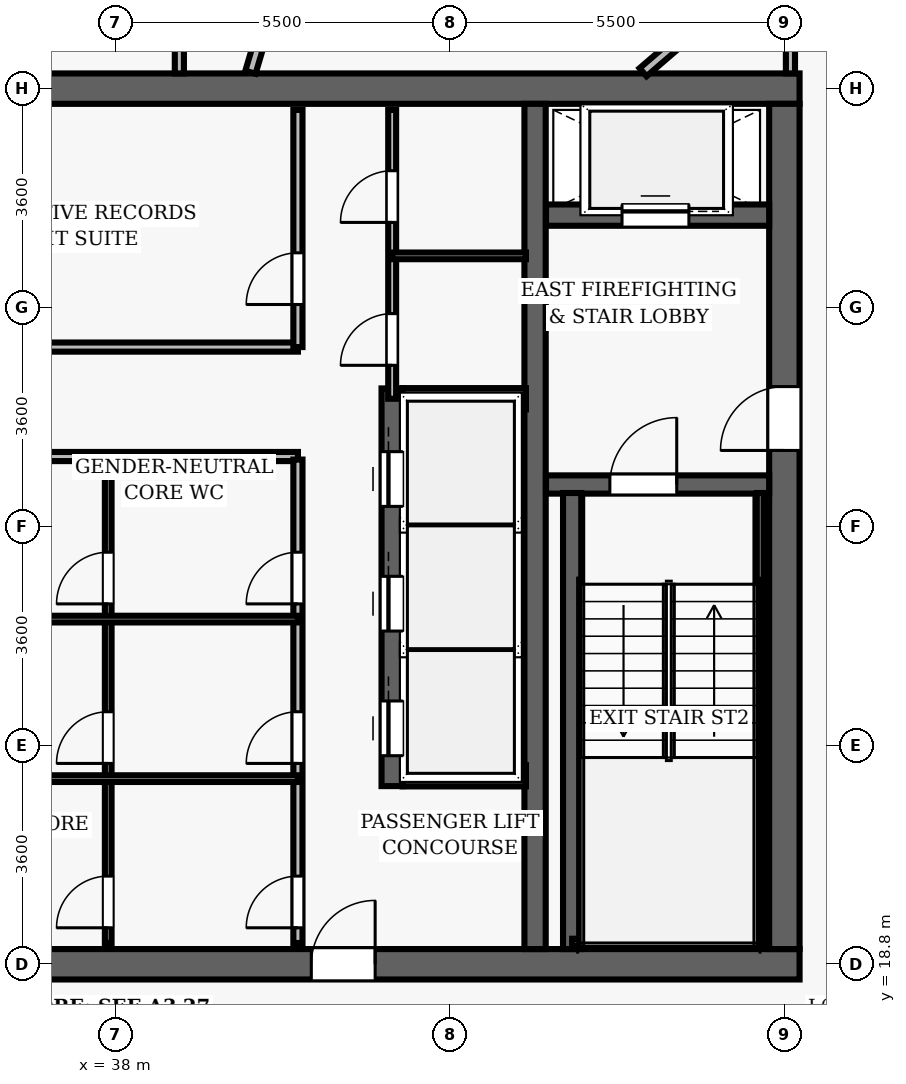
"""IFC4 building model, lengths in metres.
Left out: names, types, materials, properties, quantities, classifications, styles, units other than length and angle.
Written with IfcOpenShell. Run it as: python <this file> out.ifc"""

import sys

from ifc_helpers import new_model, si_unit, direction, frame, frame_2d, origin, place, context, subcontext, project, spatial, rectangle, extrude, element, fill, save


model = new_model("IFC4")
c1 = context("Model", 3, precision=1e-05, world=origin(), true_north=direction((0.0, 1.0)))
c2 = subcontext(c1, "Body", "Model", "MODEL_VIEW")
j1 = project(units=[si_unit("LENGTHUNIT", "METRE"), si_unit("PLANEANGLEUNIT", "RADIAN")], contexts=[c1])
p1 = place(None, origin())
s1 = spatial("IfcSite", under=j1, at=p1, CompositionType="ELEMENT")
p2 = place(p1, origin())
s2 = spatial("IfcBuilding", under=s1, at=p2, CompositionType="ELEMENT")
p3 = place(p2, frame((0.0, 0.0, 272.85)))
s3 = spatial("IfcBuildingStorey", under=s2, at=p3, CompositionType="ELEMENT", Elevation=272.85)
p4 = place(p3, frame((26.75, 18.8, 0.0), z_axis=(0.0, 0.0, 1.0), x_axis=(1.0, 0.0, 0.0)))
e1 = element("IfcWall", 1, at=p4, inside=s3, PredefinedType="SHEAR", context=c2, shape_type="SweptSolid", body=[
    extrude(rectangle(XDim=22.5, YDim=0.5, at=frame_2d((11.25, 0.0))), origin(), (0.0, 0.0, 1.0), 3.85),
])
p5 = place(p4, frame((14.47, 0.0, 0.0)))
e2 = element("IfcOpeningElement", 2, at=p5, cuts=e1, PredefinedType="OPENING", context=c2, shape_type="SweptSolid", body=[
    extrude(rectangle(XDim=1.05, YDim=2.15, at=frame_2d((0.525, 1.075))), frame((0.0, 0.26, 0.0), z_axis=(0.0, -1.0, 0.0), x_axis=(1.0, 0.0, 0.0)), (0.0, 0.0, 1.0), 0.52),
])
p6 = place(p3, frame((26.75, 33.2, 0.0), z_axis=(0.0, 0.0, 1.0), x_axis=(1.0, 0.0, 0.0)))
e3 = element("IfcWall", 3, at=p6, inside=s3, PredefinedType="SHEAR", context=c2, shape_type="SweptSolid", body=[
    extrude(rectangle(XDim=22.5, YDim=0.5, at=frame_2d((11.25, 0.0))), origin(), (0.0, 0.0, 1.0), 3.85),
])
p7 = place(p3, frame((49.0, 19.05, 0.0), z_axis=(0.0, 0.0, 1.0), x_axis=(0.0, 1.0, 0.0)))
e4 = element("IfcWall", 4, at=p7, inside=s3, PredefinedType="SHEAR", context=c2, shape_type="SweptSolid", body=[
    extrude(rectangle(XDim=13.9, YDim=0.5, at=frame_2d((6.95, 0.0))), origin(), (0.0, 0.0, 1.0), 3.85),
])
p8 = place(p7, frame((8.2, 0.0, 0.0)))
e5 = element("IfcOpeningElement", 5, at=p8, cuts=e4, PredefinedType="OPENING", context=c2, shape_type="SweptSolid", body=[
    extrude(rectangle(XDim=1.05, YDim=2.15, at=frame_2d((0.525, 1.075))), frame((0.0, 0.26, 0.0), z_axis=(0.0, -1.0, 0.0), x_axis=(1.0, 0.0, 0.0)), (0.0, 0.0, 1.0), 0.52),
])
p9 = place(p3, frame((44.9, 19.05, 0.0), z_axis=(0.0, 0.0, 1.0), x_axis=(0.0, 1.0, 0.0)))
e6 = element("IfcWall", 6, at=p9, inside=s3, PredefinedType="SHEAR", context=c2, shape_type="SweptSolid", body=[
    extrude(rectangle(XDim=13.9, YDim=0.35, at=frame_2d((6.95, 0.0))), origin(), (0.0, 0.0, 1.0), 3.85),
])
p10 = place(p3, frame((45.08, 26.69, 0.0), z_axis=(0.0, 0.0, 1.0), x_axis=(1.0, 0.0, 0.0)))
e7 = element("IfcWall", 7, at=p10, inside=s3, PredefinedType="SHEAR", context=c2, shape_type="SweptSolid", body=[
    extrude(rectangle(XDim=3.67, YDim=0.3, at=frame_2d((1.835, 0.0))), origin(), (0.0, 0.0, 1.0), 3.85),
])
p11 = place(p10, frame((1.05, 0.0, 0.0)))
e8 = element("IfcOpeningElement", 8, at=p11, cuts=e7, PredefinedType="OPENING", context=c2, shape_type="SweptSolid", body=[
    extrude(rectangle(XDim=1.1, YDim=2.15, at=frame_2d((0.55, 1.075))), frame((0.0, 0.16, 0.0), z_axis=(0.0, -1.0, 0.0), x_axis=(1.0, 0.0, 0.0)), (0.0, 0.0, 1.0), 0.32),
])
p12 = place(p3, frame((45.51, 19.05, 0.0), z_axis=(0.0, 0.0, 1.0), x_axis=(0.0, 1.0, 0.0)))
e9 = element("IfcWall", 9, at=p12, inside=s3, PredefinedType="SHEAR", context=c2, shape_type="SweptSolid", body=[
    extrude(rectangle(XDim=7.5, YDim=0.3, at=frame_2d((3.75, 0.0))), origin(), (0.0, 0.0, 1.0), 3.85),
])
p13 = place(p3, frame((48.605, 19.1, 0.0), z_axis=(0.0, 0.0, 1.0), x_axis=(0.0, 1.0, 0.0)))
e10 = element("IfcWall", 10, at=p13, inside=s3, PredefinedType="SHEAR", context=c2, shape_type="SweptSolid", body=[
    extrude(rectangle(XDim=7.45, YDim=0.12, at=frame_2d((3.725, 0.0))), origin(), (0.0, 0.0, 1.0), 3.85),
])
p14 = place(p3, frame((45.51, 19.16, 0.0), z_axis=(0.0, 0.0, 1.0), x_axis=(1.0, 0.0, 0.0)))
e11 = element("IfcWall", 11, at=p14, inside=s3, PredefinedType="SHEAR", context=c2, shape_type="SweptSolid", body=[
    extrude(rectangle(XDim=3.095, YDim=0.12, at=frame_2d((1.547, 0.0))), origin(), (0.0, 0.0, 1.0), 3.85),
])
p15 = place(p3, frame((45.08, 31.12, 0.0), z_axis=(0.0, 0.0, 1.0), x_axis=(1.0, 0.0, 0.0)))
e12 = element("IfcWall", 12, at=p15, inside=s3, PredefinedType="SHEAR", context=c2, shape_type="SweptSolid", body=[
    extrude(rectangle(XDim=3.67, YDim=0.35, at=frame_2d((1.835, 0.0))), origin(), (0.0, 0.0, 1.0), 3.04),
])
p16 = place(p15, frame((1.25, 0.0, 0.0)))
e13 = element("IfcOpeningElement", 13, at=p16, cuts=e12, PredefinedType="OPENING", context=c2, shape_type="SweptSolid", body=[
    extrude(rectangle(XDim=1.1, YDim=2.15, at=frame_2d((0.55, 1.075))), frame((0.0, 0.185, 0.0), z_axis=(0.0, -1.0, 0.0), x_axis=(1.0, 0.0, 0.0)), (0.0, 0.0, 1.0), 0.37),
])
p17 = place(p3, frame((42.55, 21.73, 0.0), z_axis=(0.0, 0.0, 1.0), x_axis=(0.0, 1.0, 0.0)))
e14 = element("IfcWall", 14, at=p17, inside=s3, PredefinedType="SHEAR", context=c2, shape_type="SweptSolid", body=[
    extrude(rectangle(XDim=6.54, YDim=0.35, at=frame_2d((3.27, 0.0))), origin(), (0.0, 0.0, 1.0), 3.04),
])
p18 = place(p17, frame((0.5, 0.0, 0.0)))
e15 = element("IfcOpeningElement", 15, at=p18, cuts=e14, PredefinedType="OPENING", context=c2, shape_type="SweptSolid", body=[
    extrude(rectangle(XDim=0.9, YDim=2.15, at=frame_2d((0.45, 1.075))), frame((0.0, 0.185, 0.0), z_axis=(0.0, -1.0, 0.0), x_axis=(1.0, 0.0, 0.0)), (0.0, 0.0, 1.0), 0.37),
])
p19 = place(p17, frame((2.55, 0.0, 0.0)))
e16 = element("IfcOpeningElement", 16, at=p19, cuts=e14, PredefinedType="OPENING", context=c2, shape_type="SweptSolid", body=[
    extrude(rectangle(XDim=0.9, YDim=2.15, at=frame_2d((0.45, 1.075))), frame((0.0, 0.185, 0.0), z_axis=(0.0, -1.0, 0.0), x_axis=(1.0, 0.0, 0.0)), (0.0, 0.0, 1.0), 0.37),
])
p20 = place(p17, frame((4.6, 0.0, 0.0)))
e17 = element("IfcOpeningElement", 17, at=p20, cuts=e14, PredefinedType="OPENING", context=c2, shape_type="SweptSolid", body=[
    extrude(rectangle(XDim=0.9, YDim=2.15, at=frame_2d((0.45, 1.075))), frame((0.0, 0.185, 0.0), z_axis=(0.0, -1.0, 0.0), x_axis=(1.0, 0.0, 0.0)), (0.0, 0.0, 1.0), 0.37),
])
for number, where, z_axis, x_axis in (
    (18, (42.72, 21.9, 0.0), (0.0, 0.0, 1.0), (1.0, 0.0, 0.0)),
    (19, (42.72, 28.1, 0.0), (0.0, 0.0, 1.0), (1.0, 0.0, 0.0)),
):
    element("IfcWall", number, at=place(p3, frame(where, z_axis=z_axis, x_axis=x_axis)), inside=s3, PredefinedType="SHEAR", context=c2, shape_type="SweptSolid", body=[
        extrude(rectangle(XDim=2.03, YDim=0.35, at=frame_2d((1.015, 0.0))), origin(), (0.0, 0.0, 1.0), 3.04),
    ])
for number, where, z_axis, x_axis in (
    (20, (34.64, 27.15, 0.0), (0.0, 0.0, 1.0), (1.0, 0.0, 0.0)),
    (21, (34.64, 28.95, 0.0), (0.0, 0.0, 1.0), (1.0, 0.0, 0.0)),
):
    element("IfcWall", number, at=place(p3, frame(where, z_axis=z_axis, x_axis=x_axis)), inside=s3, PredefinedType="PARTITIONING", context=c2, shape_type="SweptSolid", body=[
        extrude(rectangle(XDim=6.36, YDim=0.15, at=frame_2d((3.18, 0.0))), origin(), (0.0, 0.0, 1.0), 3.04),
    ])
p21 = place(p3, frame((41.0, 28.95, 0.0), z_axis=(0.0, 0.0, 1.0), x_axis=(0.0, 1.0, 0.0)))
e22 = element("IfcWall", 22, at=p21, inside=s3, PredefinedType="PARTITIONING", context=c2, shape_type="SweptSolid", body=[
    extrude(rectangle(XDim=3.9, YDim=0.15, at=frame_2d((1.95, 0.0))), origin(), (0.0, 0.0, 1.0), 3.04),
])
p22 = place(p21, frame((0.7, 0.0, 0.0)))
e23 = element("IfcOpeningElement", 23, at=p22, cuts=e22, PredefinedType="OPENING", context=c2, shape_type="SweptSolid", body=[
    extrude(rectangle(XDim=0.85, YDim=2.1, at=frame_2d((0.425, 1.05))), frame((0.0, 0.085, 0.0), z_axis=(0.0, -1.0, 0.0), x_axis=(1.0, 0.0, 0.0)), (0.0, 0.0, 1.0), 0.17),
])
p23 = place(p3, frame((41.0, 19.15, 0.0), z_axis=(0.0, 0.0, 1.0), x_axis=(0.0, 1.0, 0.0)))
e24 = element("IfcWall", 24, at=p23, inside=s3, PredefinedType="PARTITIONING", context=c2, shape_type="SweptSolid", body=[
    extrude(rectangle(XDim=7.95, YDim=0.15, at=frame_2d((3.975, 0.0))), origin(), (0.0, 0.0, 1.0), 3.04),
])
p24 = place(p23, frame((0.25, 0.0, 0.0)))
e25 = element("IfcOpeningElement", 25, at=p24, cuts=e24, PredefinedType="OPENING", context=c2, shape_type="SweptSolid", body=[
    extrude(rectangle(XDim=0.85, YDim=2.1, at=frame_2d((0.425, 1.05))), frame((0.0, 0.085, 0.0), z_axis=(0.0, -1.0, 0.0), x_axis=(1.0, 0.0, 0.0)), (0.0, 0.0, 1.0), 0.17),
])
p25 = place(p23, frame((2.953, 0.0, 0.0)))
e26 = element("IfcOpeningElement", 26, at=p25, cuts=e24, PredefinedType="OPENING", context=c2, shape_type="SweptSolid", body=[
    extrude(rectangle(XDim=0.85, YDim=2.1, at=frame_2d((0.425, 1.05))), frame((0.0, 0.085, 0.0), z_axis=(0.0, -1.0, 0.0), x_axis=(1.0, 0.0, 0.0)), (0.0, 0.0, 1.0), 0.17),
])
p26 = place(p23, frame((5.576, 0.0, 0.0)))
e27 = element("IfcOpeningElement", 27, at=p26, cuts=e24, PredefinedType="OPENING", context=c2, shape_type="SweptSolid", body=[
    extrude(rectangle(XDim=0.85, YDim=2.1, at=frame_2d((0.425, 1.05))), frame((0.0, 0.085, 0.0), z_axis=(0.0, -1.0, 0.0), x_axis=(1.0, 0.0, 0.0)), (0.0, 0.0, 1.0), 0.17),
])
p27 = place(p3, frame((37.88, 19.15, 0.0), z_axis=(0.0, 0.0, 1.0), x_axis=(0.0, 1.0, 0.0)))
e28 = element("IfcWall", 28, at=p27, inside=s3, PredefinedType="PARTITIONING", context=c2, shape_type="SweptSolid", body=[
    extrude(rectangle(XDim=7.95, YDim=0.11, at=frame_2d((3.975, 0.0))), origin(), (0.0, 0.0, 1.0), 3.04),
])
p28 = place(p27, frame((0.25, 0.0, 0.0)))
e29 = element("IfcOpeningElement", 29, at=p28, cuts=e28, PredefinedType="OPENING", context=c2, shape_type="SweptSolid", body=[
    extrude(rectangle(XDim=0.85, YDim=2.1, at=frame_2d((0.425, 1.05))), frame((0.0, 0.065, 0.0), z_axis=(0.0, -1.0, 0.0), x_axis=(1.0, 0.0, 0.0)), (0.0, 0.0, 1.0), 0.13),
])
p29 = place(p27, frame((2.953, 0.0, 0.0)))
e30 = element("IfcOpeningElement", 30, at=p29, cuts=e28, PredefinedType="OPENING", context=c2, shape_type="SweptSolid", body=[
    extrude(rectangle(XDim=0.85, YDim=2.1, at=frame_2d((0.425, 1.05))), frame((0.0, 0.065, 0.0), z_axis=(0.0, -1.0, 0.0), x_axis=(1.0, 0.0, 0.0)), (0.0, 0.0, 1.0), 0.13),
])
p30 = place(p27, frame((5.576, 0.0, 0.0)))
e31 = element("IfcOpeningElement", 31, at=p30, cuts=e28, PredefinedType="OPENING", context=c2, shape_type="SweptSolid", body=[
    extrude(rectangle(XDim=0.85, YDim=2.1, at=frame_2d((0.425, 1.05))), frame((0.0, 0.065, 0.0), z_axis=(0.0, -1.0, 0.0), x_axis=(1.0, 0.0, 0.0)), (0.0, 0.0, 1.0), 0.13),
])
for number, where, z_axis, x_axis in (
    (32, (34.75, 21.853, 0.0), (0.0, 0.0, 1.0), (1.0, 0.0, 0.0)),
    (33, (34.75, 24.477, 0.0), (0.0, 0.0, 1.0), (1.0, 0.0, 0.0)),
):
    element("IfcWall", number, at=place(p3, frame(where, z_axis=z_axis, x_axis=x_axis)), inside=s3, PredefinedType="PARTITIONING", context=c2, shape_type="SweptSolid", body=[
        extrude(rectangle(XDim=6.25, YDim=0.11, at=frame_2d((3.125, 0.0))), origin(), (0.0, 0.0, 1.0), 3.04),
    ])
p31 = place(p3, frame((42.55, 28.1, 0.0), z_axis=(0.0, 0.0, 1.0), x_axis=(0.0, 1.0, 0.0)))
e34 = element("IfcWall", 34, at=p31, inside=s3, PredefinedType="PARTITIONING", context=c2, shape_type="SweptSolid", body=[
    extrude(rectangle(XDim=4.75, YDim=0.13, at=frame_2d((2.375, 0.0))), origin(), (0.0, 0.0, 1.0), 3.04),
])
p32 = place(p31, frame((0.55, 0.0, 0.0)))
e35 = element("IfcOpeningElement", 35, at=p32, cuts=e34, PredefinedType="OPENING", context=c2, shape_type="SweptSolid", body=[
    extrude(rectangle(XDim=0.85, YDim=2.1, at=frame_2d((0.425, 1.05))), frame((0.0, 0.075, 0.0), z_axis=(0.0, -1.0, 0.0), x_axis=(1.0, 0.0, 0.0)), (0.0, 0.0, 1.0), 0.15),
])
p33 = place(p31, frame((2.9, 0.0, 0.0)))
e36 = element("IfcOpeningElement", 36, at=p33, cuts=e34, PredefinedType="OPENING", context=c2, shape_type="SweptSolid", body=[
    extrude(rectangle(XDim=0.85, YDim=2.1, at=frame_2d((0.425, 1.05))), frame((0.0, 0.075, 0.0), z_axis=(0.0, -1.0, 0.0), x_axis=(1.0, 0.0, 0.0)), (0.0, 0.0, 1.0), 0.15),
])
p34 = place(p3, frame((42.55, 30.45, 0.0), z_axis=(0.0, 0.0, 1.0), x_axis=(1.0, 0.0, 0.0)))
e37 = element("IfcWall", 37, at=p34, inside=s3, PredefinedType="PARTITIONING", context=c2, shape_type="SweptSolid", body=[
    extrude(rectangle(XDim=2.2, YDim=0.11, at=frame_2d((1.1, 0.0))), origin(), (0.0, 0.0, 1.0), 3.04),
])
p35 = place(p3, frame((49.1, 33.45, 0.0), z_axis=(0.0, 0.0, 1.0), x_axis=(0.0, 1.0, 0.0)))
e38 = element("IfcWall", 38, at=p35, inside=s3, PredefinedType="PARTITIONING", context=c2, shape_type="SweptSolid", body=[
    extrude(rectangle(XDim=7.276, YDim=0.15, at=frame_2d((3.638, 0.0))), origin(), (0.0, 0.0, 1.0), 3.04),
])
p36 = place(p35, frame((2.607, 0.0, 0.0)))
e39 = element("IfcOpeningElement", 39, at=p36, cuts=e38, PredefinedType="OPENING", context=c2, shape_type="SweptSolid", body=[
    extrude(rectangle(XDim=0.95, YDim=2.15, at=frame_2d((0.475, 1.075))), frame((0.0, 0.085, 0.0), z_axis=(0.0, -1.0, 0.0), x_axis=(1.0, 0.0, 0.0)), (0.0, 0.0, 1.0), 0.17),
])
p37 = place(p3, frame((39.05, 33.45, 0.0), z_axis=(0.0, 0.0, 1.0), x_axis=(0.0, 1.0, 0.0)))
e40 = element("IfcWall", 40, at=p37, inside=s3, PredefinedType="PARTITIONING", context=c2, shape_type="SweptSolid", body=[
    extrude(rectangle(XDim=6.95, YDim=0.15, at=frame_2d((3.475, 0.0))), origin(), (0.0, 0.0, 1.0), 3.04),
])
p38 = place(p37, frame((1.262, 0.0, 0.0)))
e41 = element("IfcOpeningElement", 41, at=p38, cuts=e40, PredefinedType="OPENING", context=c2, shape_type="SweptSolid", body=[
    extrude(rectangle(XDim=0.95, YDim=2.15, at=frame_2d((0.475, 1.075))), frame((0.0, 0.085, 0.0), z_axis=(0.0, -1.0, 0.0), x_axis=(1.0, 0.0, 0.0)), (0.0, 0.0, 1.0), 0.17),
])
p39 = place(p3, frame((46.676, 33.47, 0.0), z_axis=(0.0, 0.0, 1.0), x_axis=(0.757802183171, 0.652484368534, 0.0)))
e42 = element("IfcWall", 42, at=p39, inside=s3, PredefinedType="PARTITIONING", context=c2, shape_type="SweptSolid", body=[
    extrude(rectangle(XDim=3.014, YDim=0.175, at=frame_2d((1.507, 0.0))), origin(), (0.0, 0.0, 1.0), 3.04),
])
p40 = place(p3, frame((40.219, 33.47, 0.0), z_axis=(0.0, 0.0, 1.0), x_axis=(0.284773538312, 0.958594821537, 0.0)))
e43 = element("IfcWall", 43, at=p40, inside=s3, PredefinedType="PARTITIONING", context=c2, shape_type="SweptSolid", body=[
    extrude(rectangle(XDim=13.282, YDim=0.175, at=frame_2d((6.641, 0.0))), origin(), (0.0, 0.0, 1.0), 3.04),
])
p41 = place(p11, origin())
e44 = element("IfcDoor", 44, at=p41, inside=s3, OperationType="SINGLE_SWING_RIGHT", PredefinedType="DOOR", context=c2, shape_type="SweptSolid", body=[
    extrude(rectangle(XDim=1.1, YDim=2.15, at=frame_2d((0.55, 1.075))), frame((0.0, 0.025, 0.0), z_axis=(0.0, -1.0, 0.0), x_axis=(1.0, 0.0, 0.0)), (0.0, 0.0, 1.0), 0.05),
])
fill(e8, e44)
p42 = place(p8, origin())
e45 = element("IfcDoor", 45, at=p42, inside=s3, OperationType="SINGLE_SWING_LEFT", PredefinedType="DOOR", context=c2, shape_type="SweptSolid", body=[
    extrude(rectangle(XDim=1.05, YDim=2.15, at=frame_2d((0.525, 1.075))), frame((0.0, 0.025, 0.0), z_axis=(0.0, -1.0, 0.0), x_axis=(1.0, 0.0, 0.0)), (0.0, 0.0, 1.0), 0.05),
])
fill(e5, e45)
p43 = place(p5, origin())
e46 = element("IfcDoor", 46, at=p43, inside=s3, OperationType="SINGLE_SWING_RIGHT", PredefinedType="DOOR", context=c2, shape_type="SweptSolid", body=[
    extrude(rectangle(XDim=1.05, YDim=2.15, at=frame_2d((0.525, 1.075))), frame((0.0, 0.025, 0.0), z_axis=(0.0, -1.0, 0.0), x_axis=(1.0, 0.0, 0.0)), (0.0, 0.0, 1.0), 0.05),
])
fill(e2, e46)
p44 = place(p22, origin())
e47 = element("IfcDoor", 47, at=p44, inside=s3, OperationType="SINGLE_SWING_LEFT", PredefinedType="DOOR", context=c2, shape_type="SweptSolid", body=[
    extrude(rectangle(XDim=0.85, YDim=2.1, at=frame_2d((0.425, 1.05))), frame((0.0, 0.025, 0.0), z_axis=(0.0, -1.0, 0.0), x_axis=(1.0, 0.0, 0.0)), (0.0, 0.0, 1.0), 0.05),
])
fill(e23, e47)
p45 = place(p24, origin())
e48 = element("IfcDoor", 48, at=p45, inside=s3, OperationType="SINGLE_SWING_LEFT", PredefinedType="DOOR", context=c2, shape_type="SweptSolid", body=[
    extrude(rectangle(XDim=0.85, YDim=2.1, at=frame_2d((0.425, 1.05))), frame((0.0, 0.025, 0.0), z_axis=(0.0, -1.0, 0.0), x_axis=(1.0, 0.0, 0.0)), (0.0, 0.0, 1.0), 0.05),
])
fill(e25, e48)
p46 = place(p28, origin())
e49 = element("IfcDoor", 49, at=p46, inside=s3, OperationType="SINGLE_SWING_LEFT", PredefinedType="DOOR", context=c2, shape_type="SweptSolid", body=[
    extrude(rectangle(XDim=0.85, YDim=2.1, at=frame_2d((0.425, 1.05))), frame((0.0, 0.025, 0.0), z_axis=(0.0, -1.0, 0.0), x_axis=(1.0, 0.0, 0.0)), (0.0, 0.0, 1.0), 0.05),
])
fill(e29, e49)
p47 = place(p25, origin())
e50 = element("IfcDoor", 50, at=p47, inside=s3, OperationType="SINGLE_SWING_LEFT", PredefinedType="DOOR", context=c2, shape_type="SweptSolid", body=[
    extrude(rectangle(XDim=0.85, YDim=2.1, at=frame_2d((0.425, 1.05))), frame((0.0, 0.025, 0.0), z_axis=(0.0, -1.0, 0.0), x_axis=(1.0, 0.0, 0.0)), (0.0, 0.0, 1.0), 0.05),
])
fill(e26, e50)
p48 = place(p29, origin())
e51 = element("IfcDoor", 51, at=p48, inside=s3, OperationType="SINGLE_SWING_LEFT", PredefinedType="DOOR", context=c2, shape_type="SweptSolid", body=[
    extrude(rectangle(XDim=0.85, YDim=2.1, at=frame_2d((0.425, 1.05))), frame((0.0, 0.025, 0.0), z_axis=(0.0, -1.0, 0.0), x_axis=(1.0, 0.0, 0.0)), (0.0, 0.0, 1.0), 0.05),
])
fill(e30, e51)
p49 = place(p26, origin())
e52 = element("IfcDoor", 52, at=p49, inside=s3, OperationType="SINGLE_SWING_LEFT", PredefinedType="DOOR", context=c2, shape_type="SweptSolid", body=[
    extrude(rectangle(XDim=0.85, YDim=2.1, at=frame_2d((0.425, 1.05))), frame((0.0, 0.025, 0.0), z_axis=(0.0, -1.0, 0.0), x_axis=(1.0, 0.0, 0.0)), (0.0, 0.0, 1.0), 0.05),
])
fill(e27, e52)
p50 = place(p30, origin())
e53 = element("IfcDoor", 53, at=p50, inside=s3, OperationType="SINGLE_SWING_LEFT", PredefinedType="DOOR", context=c2, shape_type="SweptSolid", body=[
    extrude(rectangle(XDim=0.85, YDim=2.1, at=frame_2d((0.425, 1.05))), frame((0.0, 0.025, 0.0), z_axis=(0.0, -1.0, 0.0), x_axis=(1.0, 0.0, 0.0)), (0.0, 0.0, 1.0), 0.05),
])
fill(e31, e53)
p51 = place(p32, origin())
e54 = element("IfcDoor", 54, at=p51, inside=s3, OperationType="SINGLE_SWING_LEFT", PredefinedType="DOOR", context=c2, shape_type="SweptSolid", body=[
    extrude(rectangle(XDim=0.85, YDim=2.1, at=frame_2d((0.425, 1.05))), frame((0.0, 0.025, 0.0), z_axis=(0.0, -1.0, 0.0), x_axis=(1.0, 0.0, 0.0)), (0.0, 0.0, 1.0), 0.05),
])
fill(e35, e54)
p52 = place(p33, origin())
e55 = element("IfcDoor", 55, at=p52, inside=s3, OperationType="SINGLE_SWING_LEFT", PredefinedType="DOOR", context=c2, shape_type="SweptSolid", body=[
    extrude(rectangle(XDim=0.85, YDim=2.1, at=frame_2d((0.425, 1.05))), frame((0.0, 0.025, 0.0), z_axis=(0.0, -1.0, 0.0), x_axis=(1.0, 0.0, 0.0)), (0.0, 0.0, 1.0), 0.05),
])
fill(e36, e55)
p53 = place(p18, origin())
e56 = element("IfcDoor", 56, at=p53, inside=s3, OperationType="SLIDING_TO_LEFT", PredefinedType="DOOR", context=c2, shape_type="SweptSolid", body=[
    extrude(rectangle(XDim=0.9, YDim=2.15, at=frame_2d((0.45, 1.075))), frame((0.0, 0.025, 0.0), z_axis=(0.0, -1.0, 0.0), x_axis=(1.0, 0.0, 0.0)), (0.0, 0.0, 1.0), 0.05),
])
fill(e15, e56)
p54 = place(p19, origin())
e57 = element("IfcDoor", 57, at=p54, inside=s3, OperationType="SLIDING_TO_LEFT", PredefinedType="DOOR", context=c2, shape_type="SweptSolid", body=[
    extrude(rectangle(XDim=0.9, YDim=2.15, at=frame_2d((0.45, 1.075))), frame((0.0, 0.025, 0.0), z_axis=(0.0, -1.0, 0.0), x_axis=(1.0, 0.0, 0.0)), (0.0, 0.0, 1.0), 0.05),
])
fill(e16, e57)
p55 = place(p20, origin())
e58 = element("IfcDoor", 58, at=p55, inside=s3, OperationType="SLIDING_TO_LEFT", PredefinedType="DOOR", context=c2, shape_type="SweptSolid", body=[
    extrude(rectangle(XDim=0.9, YDim=2.15, at=frame_2d((0.45, 1.075))), frame((0.0, 0.025, 0.0), z_axis=(0.0, -1.0, 0.0), x_axis=(1.0, 0.0, 0.0)), (0.0, 0.0, 1.0), 0.05),
])
fill(e17, e58)
p56 = place(p16, origin())
e59 = element("IfcDoor", 59, at=p56, inside=s3, OperationType="SLIDING_TO_LEFT", PredefinedType="DOOR", context=c2, shape_type="SweptSolid", body=[
    extrude(rectangle(XDim=1.1, YDim=2.15, at=frame_2d((0.55, 1.075))), frame((0.0, 0.025, 0.0), z_axis=(0.0, -1.0, 0.0), x_axis=(1.0, 0.0, 0.0)), (0.0, 0.0, 1.0), 0.05),
])
fill(e13, e59)
save(model, sys.argv[1])
